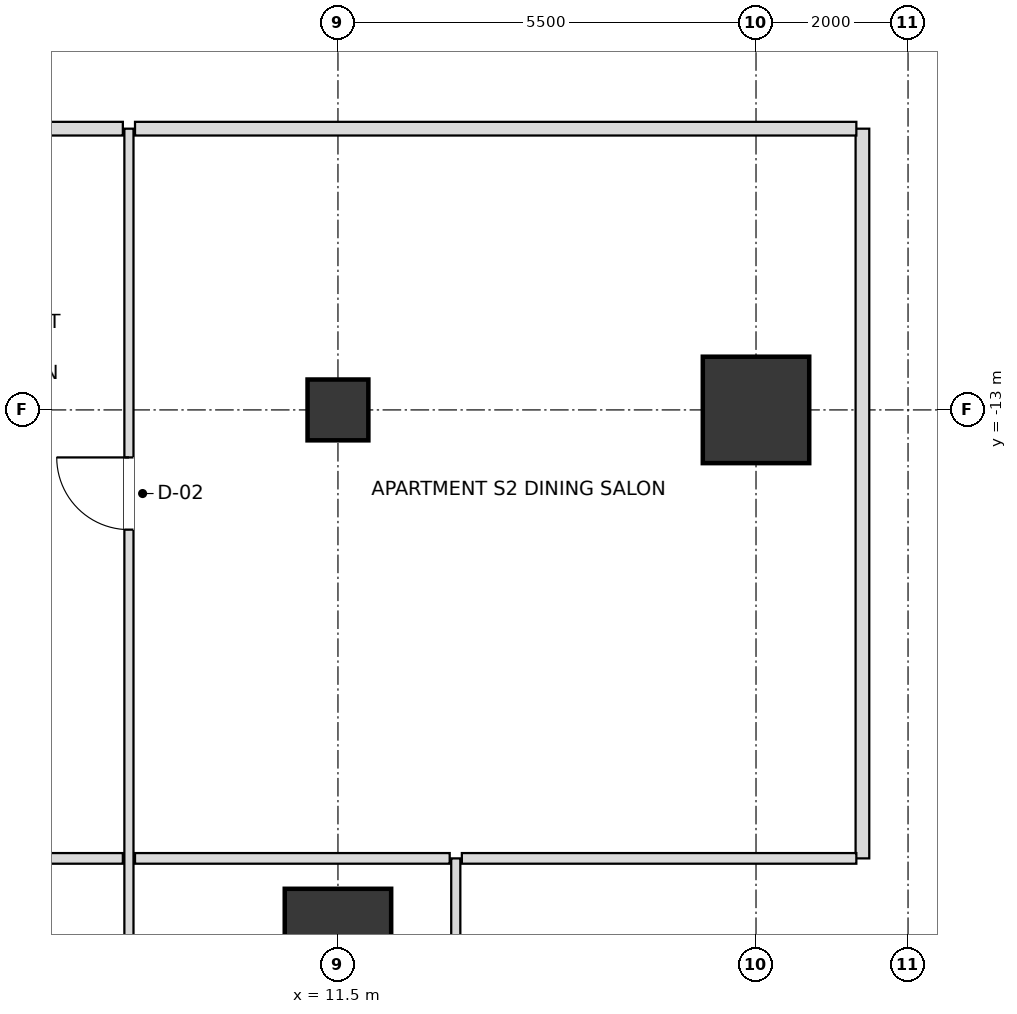
"""IFC4 building model, lengths in metres.
Left out: names, types, materials, properties, quantities, classifications, styles, units other than length and angle.
Written with IfcOpenShell. Run it as: python <this file> out.ifc"""

import sys

from ifc_helpers import new_model, si_unit, direction, frame, frame_2d, origin, origin_2d, place, context, subcontext, project, spatial, rectangle, extrude, element, fill, save


model = new_model("IFC4")
c1 = context("Model", 3, precision=1e-05, world=origin(), true_north=direction((0.0, 1.0)))
c2 = subcontext(c1, "Body", "Model", "MODEL_VIEW")
j1 = project(units=[si_unit("LENGTHUNIT", "METRE"), si_unit("PLANEANGLEUNIT", "RADIAN")], contexts=[c1])
p1 = place(None, origin())
s1 = spatial("IfcSite", under=j1, at=p1, CompositionType="ELEMENT")
p2 = place(p1, origin())
s2 = spatial("IfcBuilding", under=s1, at=p2, CompositionType="ELEMENT")
p3 = place(p2, frame((0.0, 0.0, 75.6)))
s3 = spatial("IfcBuildingStorey", under=s2, at=p3, CompositionType="ELEMENT", Elevation=75.6)
for number, where, z_axis, x_axis in (
    (1, (11.5, -20.0, 0.0), (0.0, 0.0, 1.0), (1.0, 0.0, 0.0)),
    (2, (17.0, -13.0, 0.0), (0.0, 0.0, 1.0), (1.0, 0.0, 0.0)),
):
    element("IfcColumn", number, at=place(p3, frame(where, z_axis=z_axis, x_axis=x_axis)), inside=s3, PredefinedType="USERDEFINED", context=c2, shape_type="SweptSolid", body=[
        extrude(rectangle(XDim=1.4, YDim=1.4, at=origin_2d()), origin(), (0.0, 0.0, 1.0), 3.6),
    ])
p4 = place(p3, frame((11.5, -13.0, 0.0), z_axis=(0.0, 0.0, 1.0), x_axis=(1.0, 0.0, 0.0)))
e3 = element("IfcColumn", 3, at=p4, inside=s3, PredefinedType="COLUMN", context=c2, shape_type="SweptSolid", body=[
    extrude(rectangle(XDim=0.8, YDim=0.8, at=origin_2d()), origin(), (0.0, 0.0, 1.0), 3.6),
])
p5 = place(p3, frame((8.75, -24.9, 0.0), z_axis=(0.0, 0.0, 1.0), x_axis=(0.0, 1.0, 0.0)))
e4 = element("IfcWall", 4, at=p5, inside=s3, PredefinedType="PARTITIONING", context=c2, shape_type="SweptSolid", body=[
    extrude(rectangle(XDim=15.6, YDim=0.12, at=frame_2d((7.8, 0.0))), origin(), (0.0, 0.0, 1.0), 2.816),
])
p6 = place(p5, frame((10.325, 0.0, 0.0)))
e5 = element("IfcOpeningElement", 5, at=p6, cuts=e4, PredefinedType="OPENING", context=c2, shape_type="SweptSolid", body=[
    extrude(rectangle(XDim=0.95, YDim=2.1, at=frame_2d((0.475, 1.05))), frame((0.0, 0.07, 0.0), z_axis=(0.0, -1.0, 0.0), x_axis=(1.0, 0.0, 0.0)), (0.0, 0.0, 1.0), 0.14),
])
p7 = place(p5, frame((2.55, 0.0, 0.0)))
e6 = element("IfcOpeningElement", 6, at=p7, cuts=e4, PredefinedType="OPENING", context=c2, shape_type="SweptSolid", body=[
    extrude(rectangle(XDim=0.9, YDim=2.1, at=frame_2d((0.45, 1.05))), frame((0.0, 0.07, 0.0), z_axis=(0.0, -1.0, 0.0), x_axis=(1.0, 0.0, 0.0)), (0.0, 0.0, 1.0), 0.14),
])
p8 = place(p3, frame((13.05, -24.9, 0.0), z_axis=(0.0, 0.0, 1.0), x_axis=(0.0, 1.0, 0.0)))
e7 = element("IfcWall", 7, at=p8, inside=s3, PredefinedType="PARTITIONING", context=c2, shape_type="SweptSolid", body=[
    extrude(rectangle(XDim=6.0, YDim=0.12, at=frame_2d((3.0, 0.0))), origin(), (0.0, 0.0, 1.0), 2.736),
])
p9 = place(p8, frame((2.55, 0.0, 0.0)))
e8 = element("IfcOpeningElement", 8, at=p9, cuts=e7, PredefinedType="OPENING", context=c2, shape_type="SweptSolid", body=[
    extrude(rectangle(XDim=0.9, YDim=2.1, at=frame_2d((0.45, 1.05))), frame((0.0, 0.07, 0.0), z_axis=(0.0, -1.0, 0.0), x_axis=(1.0, 0.0, 0.0)), (0.0, 0.0, 1.0), 0.14),
])
p10 = place(p3, frame((18.4, -18.9, 0.0), z_axis=(0.0, 0.0, 1.0), x_axis=(0.0, 1.0, 0.0)))
e9 = element("IfcWall", 9, at=p10, inside=s3, PredefinedType="PARTITIONING", context=c2, shape_type="SweptSolid", body=[
    extrude(rectangle(XDim=9.6, YDim=0.18, at=frame_2d((4.8, 0.0))), origin(), (0.0, 0.0, 1.0), 2.736),
])
p11 = place(p3, frame((5.63, -18.9, 0.0), z_axis=(0.0, 0.0, 1.0), x_axis=(1.0, 0.0, 0.0)))
e10 = element("IfcWall", 10, at=p11, inside=s3, PredefinedType="PARTITIONING", context=c2, shape_type="SweptSolid", body=[
    extrude(rectangle(XDim=3.04, YDim=0.14, at=frame_2d((1.52, 0.0))), origin(), (0.0, 0.0, 1.0), 2.816),
])
p12 = place(p3, frame((8.83, -18.9, 0.0), z_axis=(0.0, 0.0, 1.0), x_axis=(1.0, 0.0, 0.0)))
e11 = element("IfcWall", 11, at=p12, inside=s3, PredefinedType="PARTITIONING", context=c2, shape_type="SweptSolid", body=[
    extrude(rectangle(XDim=4.14, YDim=0.14, at=frame_2d((2.07, 0.0))), origin(), (0.0, 0.0, 1.0), 2.736),
])
p13 = place(p3, frame((13.13, -18.9, 0.0), z_axis=(0.0, 0.0, 1.0), x_axis=(1.0, 0.0, 0.0)))
e12 = element("IfcWall", 12, at=p13, inside=s3, PredefinedType="PARTITIONING", context=c2, shape_type="SweptSolid", body=[
    extrude(rectangle(XDim=5.19, YDim=0.14, at=frame_2d((2.595, 0.0))), origin(), (0.0, 0.0, 1.0), 2.736),
])
p14 = place(p3, frame((5.63, -9.3, 0.0), z_axis=(0.0, 0.0, 1.0), x_axis=(1.0, 0.0, 0.0)))
e13 = element("IfcWall", 13, at=p14, inside=s3, PredefinedType="PARTITIONING", context=c2, shape_type="SweptSolid", body=[
    extrude(rectangle(XDim=3.04, YDim=0.18, at=frame_2d((1.52, 0.0))), origin(), (0.0, 0.0, 1.0), 2.816),
])
p15 = place(p3, frame((8.83, -9.3, 0.0), z_axis=(0.0, 0.0, 1.0), x_axis=(1.0, 0.0, 0.0)))
e14 = element("IfcWall", 14, at=p15, inside=s3, PredefinedType="PARTITIONING", context=c2, shape_type="SweptSolid", body=[
    extrude(rectangle(XDim=9.49, YDim=0.18, at=frame_2d((4.745, 0.0))), origin(), (0.0, 0.0, 1.0), 2.816),
])
p16 = place(p6, origin())
e15 = element("IfcDoor", 15, at=p16, inside=s3, OperationType="SINGLE_SWING_RIGHT", PredefinedType="DOOR", context=c2, shape_type="SweptSolid", body=[
    extrude(rectangle(XDim=0.95, YDim=2.1, at=frame_2d((0.475, 1.05))), frame((0.0, 0.025, 0.0), z_axis=(0.0, -1.0, 0.0), x_axis=(1.0, 0.0, 0.0)), (0.0, 0.0, 1.0), 0.05),
])
fill(e5, e15)
save(model, sys.argv[1])
